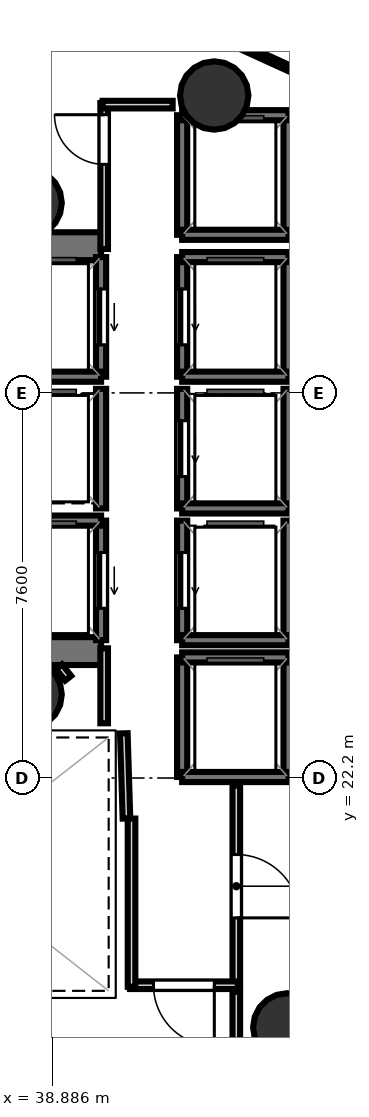
"""IFC4 building model, lengths in metres.
Left out: names, types, materials, properties, quantities, classifications, styles, units other than length and angle.
Written with IfcOpenShell. Run it as: python <this file> out.ifc"""

import sys

from ifc_helpers import new_model, si_unit, direction, frame, frame_2d, origin, origin_2d, place, context, subcontext, project, spatial, rectangle, hollow_circle, extrude, element, fill, save


model = new_model("IFC4")
c1 = context("Model", 3, precision=1e-05, world=origin(), true_north=direction((0.0, 1.0)))
c2 = subcontext(c1, "Body", "Model", "MODEL_VIEW")
j1 = project(units=[si_unit("LENGTHUNIT", "METRE"), si_unit("PLANEANGLEUNIT", "RADIAN")], contexts=[c1])
p1 = place(None, origin())
s1 = spatial("IfcSite", under=j1, at=p1, CompositionType="ELEMENT")
p2 = place(p1, origin())
s2 = spatial("IfcBuilding", under=s1, at=p2, CompositionType="ELEMENT")
p3 = place(p2, frame((0.0, 0.0, 147.6)))
s3 = spatial("IfcBuildingStorey", under=s2, at=p3, CompositionType="ELEMENT", Elevation=147.6)
p4 = place(p3, frame((29.23, 32.695, 0.0), z_axis=(0.0, 0.0, 1.0), x_axis=(1.0, 0.0, 0.0)))
e1 = element("IfcWall", 1, at=p4, inside=s3, PredefinedType="SHEAR", context=c2, shape_type="SweptSolid", body=[
    extrude(rectangle(XDim=10.62, YDim=0.55, at=frame_2d((5.31, 0.0))), origin(), (0.0, 0.0, 1.0), 3.52),
])
p5 = place(p4, frame((0.995, 0.0, 0.0)))
e2 = element("IfcOpeningElement", 2, at=p5, cuts=e1, PredefinedType="OPENING", context=c2, shape_type="SweptSolid", body=[
    extrude(rectangle(XDim=1.25, YDim=2.15, at=frame_2d((0.625, 1.075))), frame((0.0, 0.285, 0.0), z_axis=(0.0, -1.0, 0.0), x_axis=(1.0, 0.0, 0.0)), (0.0, 0.0, 1.0), 0.57),
])
p6 = place(p3, frame((29.23, 24.705, 0.0), z_axis=(0.0, 0.0, 1.0), x_axis=(1.0, 0.0, 0.0)))
e3 = element("IfcWall", 3, at=p6, inside=s3, PredefinedType="SHEAR", context=c2, shape_type="SweptSolid", body=[
    extrude(rectangle(XDim=10.62, YDim=0.55, at=frame_2d((5.31, 0.0))), origin(), (0.0, 0.0, 1.0), 3.52),
])
p7 = place(p6, frame((0.795, 0.0, 0.0)))
e4 = element("IfcOpeningElement", 4, at=p7, cuts=e3, PredefinedType="OPENING", context=c2, shape_type="SweptSolid", body=[
    extrude(rectangle(XDim=1.25, YDim=2.15, at=frame_2d((0.625, 1.075))), frame((0.0, 0.285, 0.0), z_axis=(0.0, -1.0, 0.0), x_axis=(1.0, 0.0, 0.0)), (0.0, 0.0, 1.0), 0.57),
])
for number, where, z_axis, x_axis in (
    (5, (38.4, 33.55, 0.0), (0.0, 0.0, 1.0), (1.0, 0.0, 0.0)),
    (6, (38.4, 23.85, 0.0), (0.0, 0.0, 1.0), (1.0, 0.0, 0.0)),
    (7, (42.083, 35.669, 0.0), (0.0, 0.0, 1.0), (1.0, 0.0, 0.0)),
    (8, (43.525, 17.279, 0.0), (0.0, 0.0, 1.0), (1.0, 0.0, 0.0)),
):
    element("IfcColumn", number, at=place(p3, frame(where, z_axis=z_axis, x_axis=x_axis)), inside=s3, PredefinedType="COLUMN", context=c2, shape_type="SweptSolid", body=[
        extrude(hollow_circle(Radius=0.675, WallThickness=0.032, at=origin_2d()), origin(), (0.0, 0.0, 1.0), 3.7),
    ])
p8 = place(p3, frame((39.85, 30.12, 0.0), z_axis=(0.0, 0.0, 1.0), x_axis=(0.0, 1.0, 0.0)))
e9 = element("IfcWall", 9, at=p8, inside=s3, PredefinedType="SOLIDWALL", context=c2, shape_type="SweptSolid", body=[
    extrude(rectangle(XDim=2.36, YDim=0.2, at=frame_2d((1.18, 0.0))), origin(), (0.0, 0.0, 1.0), 3.52),
])
p9 = place(p8, frame((0.63, 0.0, 0.0)))
e10 = element("IfcOpeningElement", 10, at=p9, cuts=e9, PredefinedType="OPENING", context=c2, shape_type="SweptSolid", body=[
    extrude(rectangle(XDim=1.1, YDim=2.15, at=frame_2d((0.55, 1.075))), frame((0.0, 0.11, 0.0), z_axis=(0.0, -1.0, 0.0), x_axis=(1.0, 0.0, 0.0)), (0.0, 0.0, 1.0), 0.22),
])
p10 = place(p3, frame((37.75, 30.12, 0.0), z_axis=(0.0, 0.0, 1.0), x_axis=(1.0, 0.0, 0.0)))
e11 = element("IfcWall", 11, at=p10, inside=s3, PredefinedType="SOLIDWALL", context=c2, shape_type="SweptSolid", body=[
    extrude(rectangle(XDim=2.1, YDim=0.2, at=frame_2d((1.05, 0.0))), origin(), (0.0, 0.0, 1.0), 3.52),
])
p11 = place(p3, frame((39.85, 24.92, 0.0), z_axis=(0.0, 0.0, 1.0), x_axis=(0.0, 1.0, 0.0)))
e12 = element("IfcWall", 12, at=p11, inside=s3, PredefinedType="SOLIDWALL", context=c2, shape_type="SweptSolid", body=[
    extrude(rectangle(XDim=2.36, YDim=0.2, at=frame_2d((1.18, 0.0))), origin(), (0.0, 0.0, 1.0), 3.52),
])
p12 = place(p11, frame((0.63, 0.0, 0.0)))
e13 = element("IfcOpeningElement", 13, at=p12, cuts=e12, PredefinedType="OPENING", context=c2, shape_type="SweptSolid", body=[
    extrude(rectangle(XDim=1.1, YDim=2.15, at=frame_2d((0.55, 1.075))), frame((0.0, 0.11, 0.0), z_axis=(0.0, -1.0, 0.0), x_axis=(1.0, 0.0, 0.0)), (0.0, 0.0, 1.0), 0.22),
])
p13 = place(p3, frame((37.75, 27.28, 0.0), z_axis=(0.0, 0.0, 1.0), x_axis=(1.0, 0.0, 0.0)))
e14 = element("IfcWall", 14, at=p13, inside=s3, PredefinedType="SOLIDWALL", context=c2, shape_type="SweptSolid", body=[
    extrude(rectangle(XDim=2.1, YDim=0.2, at=frame_2d((1.05, 0.0))), origin(), (0.0, 0.0, 1.0), 3.52),
])
p14 = place(p3, frame((43.55, 30.12, 0.0), z_axis=(0.0, 0.0, 1.0), x_axis=(0.0, 1.0, 0.0)))
e15 = element("IfcWall", 15, at=p14, inside=s3, PredefinedType="SOLIDWALL", context=c2, shape_type="SweptSolid", body=[
    extrude(rectangle(XDim=2.36, YDim=0.2, at=frame_2d((1.18, 0.0))), origin(), (0.0, 0.0, 1.0), 3.52),
])
p15 = place(p3, frame((41.45, 30.12, 0.0), z_axis=(0.0, 0.0, 1.0), x_axis=(0.0, 1.0, 0.0)))
e16 = element("IfcWall", 16, at=p15, inside=s3, PredefinedType="SOLIDWALL", context=c2, shape_type="SweptSolid", body=[
    extrude(rectangle(XDim=2.36, YDim=0.2, at=frame_2d((1.18, 0.0))), origin(), (0.0, 0.0, 1.0), 3.52),
])
p16 = place(p15, frame((0.63, 0.0, 0.0)))
e17 = element("IfcOpeningElement", 17, at=p16, cuts=e16, PredefinedType="OPENING", context=c2, shape_type="SweptSolid", body=[
    extrude(rectangle(XDim=1.1, YDim=2.15, at=frame_2d((0.55, 1.075))), frame((0.0, 0.11, 0.0), z_axis=(0.0, -1.0, 0.0), x_axis=(1.0, 0.0, 0.0)), (0.0, 0.0, 1.0), 0.22),
])
for number, where, z_axis, x_axis in (
    (18, (41.45, 32.48, 0.0), (0.0, 0.0, 1.0), (1.0, 0.0, 0.0)),
    (19, (41.45, 30.12, 0.0), (0.0, 0.0, 1.0), (1.0, 0.0, 0.0)),
):
    element("IfcWall", number, at=place(p3, frame(where, z_axis=z_axis, x_axis=x_axis)), inside=s3, PredefinedType="SOLIDWALL", context=c2, shape_type="SweptSolid", body=[
        extrude(rectangle(XDim=2.1, YDim=0.2, at=frame_2d((1.05, 0.0))), origin(), (0.0, 0.0, 1.0), 3.52),
    ])
p17 = place(p3, frame((43.55, 27.52, 0.0), z_axis=(0.0, 0.0, 1.0), x_axis=(0.0, 1.0, 0.0)))
e20 = element("IfcWall", 20, at=p17, inside=s3, PredefinedType="SOLIDWALL", context=c2, shape_type="SweptSolid", body=[
    extrude(rectangle(XDim=2.36, YDim=0.2, at=frame_2d((1.18, 0.0))), origin(), (0.0, 0.0, 1.0), 3.52),
])
p18 = place(p3, frame((41.45, 27.52, 0.0), z_axis=(0.0, 0.0, 1.0), x_axis=(0.0, 1.0, 0.0)))
e21 = element("IfcWall", 21, at=p18, inside=s3, PredefinedType="SOLIDWALL", context=c2, shape_type="SweptSolid", body=[
    extrude(rectangle(XDim=2.36, YDim=0.2, at=frame_2d((1.18, 0.0))), origin(), (0.0, 0.0, 1.0), 3.52),
])
p19 = place(p18, frame((0.63, 0.0, 0.0)))
e22 = element("IfcOpeningElement", 22, at=p19, cuts=e21, PredefinedType="OPENING", context=c2, shape_type="SweptSolid", body=[
    extrude(rectangle(XDim=1.1, YDim=2.15, at=frame_2d((0.55, 1.075))), frame((0.0, 0.11, 0.0), z_axis=(0.0, -1.0, 0.0), x_axis=(1.0, 0.0, 0.0)), (0.0, 0.0, 1.0), 0.22),
])
p20 = place(p3, frame((41.45, 27.52, 0.0), z_axis=(0.0, 0.0, 1.0), x_axis=(1.0, 0.0, 0.0)))
e23 = element("IfcWall", 23, at=p20, inside=s3, PredefinedType="SOLIDWALL", context=c2, shape_type="SweptSolid", body=[
    extrude(rectangle(XDim=2.1, YDim=0.2, at=frame_2d((1.05, 0.0))), origin(), (0.0, 0.0, 1.0), 3.52),
])
p21 = place(p3, frame((43.55, 24.92, 0.0), z_axis=(0.0, 0.0, 1.0), x_axis=(0.0, 1.0, 0.0)))
e24 = element("IfcWall", 24, at=p21, inside=s3, PredefinedType="SOLIDWALL", context=c2, shape_type="SweptSolid", body=[
    extrude(rectangle(XDim=2.36, YDim=0.2, at=frame_2d((1.18, 0.0))), origin(), (0.0, 0.0, 1.0), 3.52),
])
p22 = place(p3, frame((41.45, 24.92, 0.0), z_axis=(0.0, 0.0, 1.0), x_axis=(0.0, 1.0, 0.0)))
e25 = element("IfcWall", 25, at=p22, inside=s3, PredefinedType="SOLIDWALL", context=c2, shape_type="SweptSolid", body=[
    extrude(rectangle(XDim=2.36, YDim=0.2, at=frame_2d((1.18, 0.0))), origin(), (0.0, 0.0, 1.0), 3.52),
])
p23 = place(p22, frame((0.63, 0.0, 0.0)))
e26 = element("IfcOpeningElement", 26, at=p23, cuts=e25, PredefinedType="OPENING", context=c2, shape_type="SweptSolid", body=[
    extrude(rectangle(XDim=1.1, YDim=2.15, at=frame_2d((0.55, 1.075))), frame((0.0, 0.11, 0.0), z_axis=(0.0, -1.0, 0.0), x_axis=(1.0, 0.0, 0.0)), (0.0, 0.0, 1.0), 0.22),
])
p24 = place(p3, frame((41.45, 24.92, 0.0), z_axis=(0.0, 0.0, 1.0), x_axis=(1.0, 0.0, 0.0)))
e27 = element("IfcWall", 27, at=p24, inside=s3, PredefinedType="SOLIDWALL", context=c2, shape_type="SweptSolid", body=[
    extrude(rectangle(XDim=2.1, YDim=0.2, at=frame_2d((1.05, 0.0))), origin(), (0.0, 0.0, 1.0), 3.52),
])
p25 = place(p3, frame((39.85, 27.52, 0.0), z_axis=(0.0, 0.0, 1.0), x_axis=(0.0, 1.0, 0.0)))
e28 = element("IfcWall", 28, at=p25, inside=s3, PredefinedType="SOLIDWALL", context=c2, shape_type="SweptSolid", body=[
    extrude(rectangle(XDim=2.36, YDim=0.2, at=frame_2d((1.18, 0.0))), origin(), (0.0, 0.0, 1.0), 3.52),
])
for number, where, z_axis, x_axis in (
    (29, (43.55, 22.22, 0.0), (0.0, 0.0, 1.0), (0.0, 1.0, 0.0)),
    (30, (41.45, 22.22, 0.0), (0.0, 0.0, 1.0), (0.0, 1.0, 0.0)),
):
    element("IfcWall", number, at=place(p3, frame(where, z_axis=z_axis, x_axis=x_axis)), inside=s3, PredefinedType="SOLIDWALL", context=c2, shape_type="SweptSolid", body=[
        extrude(rectangle(XDim=2.36, YDim=0.2, at=frame_2d((1.18, 0.0))), origin(), (0.0, 0.0, 1.0), 3.52),
    ])
for number, where, z_axis, x_axis in (
    (31, (41.45, 24.58, 0.0), (0.0, 0.0, 1.0), (1.0, 0.0, 0.0)),
    (32, (41.45, 22.22, 0.0), (0.0, 0.0, 1.0), (1.0, 0.0, 0.0)),
):
    element("IfcWall", number, at=place(p3, frame(where, z_axis=z_axis, x_axis=x_axis)), inside=s3, PredefinedType="SOLIDWALL", context=c2, shape_type="SweptSolid", body=[
        extrude(rectangle(XDim=2.1, YDim=0.2, at=frame_2d((1.05, 0.0))), origin(), (0.0, 0.0, 1.0), 3.52),
    ])
for number, where, z_axis, x_axis in (
    (33, (43.55, 32.92, 0.0), (0.0, 0.0, 1.0), (0.0, 1.0, 0.0)),
    (34, (41.45, 32.92, 0.0), (0.0, 0.0, 1.0), (0.0, 1.0, 0.0)),
):
    element("IfcWall", number, at=place(p3, frame(where, z_axis=z_axis, x_axis=x_axis)), inside=s3, PredefinedType="SOLIDWALL", context=c2, shape_type="SweptSolid", body=[
        extrude(rectangle(XDim=2.36, YDim=0.2, at=frame_2d((1.18, 0.0))), origin(), (0.0, 0.0, 1.0), 3.52),
    ])
for number, where, z_axis, x_axis in (
    (35, (41.45, 35.28, 0.0), (0.0, 0.0, 1.0), (1.0, 0.0, 0.0)),
    (36, (41.45, 32.92, 0.0), (0.0, 0.0, 1.0), (1.0, 0.0, 0.0)),
):
    element("IfcWall", number, at=place(p3, frame(where, z_axis=z_axis, x_axis=x_axis)), inside=s3, PredefinedType="SOLIDWALL", context=c2, shape_type="SweptSolid", body=[
        extrude(rectangle(XDim=2.1, YDim=0.2, at=frame_2d((1.05, 0.0))), origin(), (0.0, 0.0, 1.0), 3.52),
    ])
p26 = place(p3, frame((40.351, 21.401, 0.0), z_axis=(0.0, 0.0, 1.0), x_axis=(-0.031058045979, 0.999517582527, 0.0)))
e37 = element("IfcWall", 37, at=p26, inside=s3, PredefinedType="PARTITIONING", context=c2, shape_type="SweptSolid", body=[
    extrude(rectangle(XDim=1.682, YDim=0.15, at=frame_2d((0.841, 0.0))), origin(), (0.0, 0.0, 1.0), 2.84),
])
p27 = place(p3, frame((39.911, 23.28, 0.0), z_axis=(0.0, 0.0, 1.0), x_axis=(0.0, 1.0, 0.0)))
e38 = element("IfcWall", 38, at=p27, inside=s3, PredefinedType="PARTITIONING", context=c2, shape_type="SweptSolid", body=[
    extrude(rectangle(XDim=1.48, YDim=0.15, at=frame_2d((0.74, 0.0))), origin(), (0.0, 0.0, 1.0), 2.84),
])
p28 = place(p3, frame((39.911, 32.64, 0.0), z_axis=(0.0, 0.0, 1.0), x_axis=(0.0, 1.0, 0.0)))
e39 = element("IfcWall", 39, at=p28, inside=s3, PredefinedType="PARTITIONING", context=c2, shape_type="SweptSolid", body=[
    extrude(rectangle(XDim=2.88, YDim=0.15, at=frame_2d((1.44, 0.0))), origin(), (0.0, 0.0, 1.0), 2.84),
])
p29 = place(p28, frame((1.67, 0.0, 0.0)))
e40 = element("IfcOpeningElement", 40, at=p29, cuts=e39, PredefinedType="OPENING", context=c2, shape_type="SweptSolid", body=[
    extrude(rectangle(XDim=0.98, YDim=2.1, at=frame_2d((0.49, 1.05))), frame((0.0, 0.085, 0.0), z_axis=(0.0, -1.0, 0.0), x_axis=(1.0, 0.0, 0.0)), (0.0, 0.0, 1.0), 0.17),
])
p30 = place(p3, frame((39.88, 35.489, 0.0), z_axis=(0.0, 0.0, 1.0), x_axis=(1.0, 0.0, 0.0)))
e41 = element("IfcWall", 41, at=p30, inside=s3, PredefinedType="PARTITIONING", context=c2, shape_type="SweptSolid", body=[
    extrude(rectangle(XDim=1.383, YDim=0.15, at=frame_2d((0.691, 0.0))), origin(), (0.0, 0.0, 1.0), 2.84),
])
p31 = place(p3, frame((42.519, 22.05, 0.0), z_axis=(0.0, 0.0, 1.0), x_axis=(0.0, -1.0, 0.0)))
e42 = element("IfcWall", 42, at=p31, inside=s3, PredefinedType="PARTITIONING", context=c2, shape_type="SweptSolid", body=[
    extrude(rectangle(XDim=3.97, YDim=0.15, at=frame_2d((1.985, 0.0))), origin(), (0.0, 0.0, 1.0), 2.84),
])
p32 = place(p31, frame((1.36, 0.0, 0.0)))
e43 = element("IfcOpeningElement", 43, at=p32, cuts=e42, PredefinedType="OPENING", context=c2, shape_type="SweptSolid", body=[
    extrude(rectangle(XDim=1.25, YDim=2.2, at=frame_2d((0.625, 1.1))), frame((0.0, 0.085, 0.0), z_axis=(0.0, -1.0, 0.0), x_axis=(1.0, 0.0, 0.0)), (0.0, 0.0, 1.0), 0.17),
])
p33 = place(p3, frame((42.55, 18.111, 0.0), z_axis=(0.0, 0.0, 1.0), x_axis=(-1.0, 0.0, 0.0)))
e44 = element("IfcWall", 44, at=p33, inside=s3, PredefinedType="PARTITIONING", context=c2, shape_type="SweptSolid", body=[
    extrude(rectangle(XDim=2.13, YDim=0.15, at=frame_2d((1.065, 0.0))), origin(), (0.0, 0.0, 1.0), 2.84),
])
p34 = place(p33, frame((0.465, 0.0, 0.0)))
e45 = element("IfcOpeningElement", 45, at=p34, cuts=e44, PredefinedType="OPENING", context=c2, shape_type="SweptSolid", body=[
    extrude(rectangle(XDim=1.2, YDim=2.15, at=frame_2d((0.6, 1.075))), frame((0.0, 0.085, 0.0), z_axis=(0.0, -1.0, 0.0), x_axis=(1.0, 0.0, 0.0)), (0.0, 0.0, 1.0), 0.17),
])
p35 = place(p3, frame((40.451, 18.08, 0.0), z_axis=(0.0, 0.0, 1.0), x_axis=(0.0, 1.0, 0.0)))
e46 = element("IfcWall", 46, at=p35, inside=s3, PredefinedType="PARTITIONING", context=c2, shape_type="SweptSolid", body=[
    extrude(rectangle(XDim=3.32, YDim=0.15, at=frame_2d((1.66, 0.0))), origin(), (0.0, 0.0, 1.0), 2.84),
])
p36 = place(p3, frame((39.202, 24.169, 0.0), z_axis=(0.0, 0.0, 1.0), x_axis=(-0.622453876994, 0.782656483405, 0.0)))
e47 = element("IfcWall", 47, at=p36, inside=s3, PredefinedType="PARTITIONING", context=c2, shape_type="SweptSolid", body=[
    extrude(rectangle(XDim=0.292, YDim=0.15, at=frame_2d((0.146, 0.0))), origin(), (0.0, 0.0, 1.0), 2.84),
])
p37 = place(p3, frame((42.519, 17.98, 0.0), z_axis=(0.0, 0.0, 1.0), x_axis=(0.0, -1.0, 0.0)))
e48 = element("IfcWall", 48, at=p37, inside=s3, PredefinedType="PARTITIONING", context=c2, shape_type="SweptSolid", body=[
    extrude(rectangle(XDim=3.288, YDim=0.15, at=frame_2d((1.644, 0.0))), origin(), (0.0, 0.0, 1.0), 2.84),
])
p38 = place(p3, frame((29.39, 42.669, 0.0), z_axis=(0.0, 0.0, 1.0), x_axis=(0.90986951671, -0.414894519802, 0.0)))
e49 = element("IfcWall", 49, at=p38, inside=s3, PredefinedType="PARTITIONING", context=c2, shape_type="SweptSolid", body=[
    extrude(rectangle(XDim=21.884, YDim=0.12, at=frame_2d((10.942, 0.0))), origin(), (0.0, 0.0, 1.0), 2.84),
])
p39 = place(p9, origin())
e50 = element("IfcDoor", 50, at=p39, inside=s3, OperationType="SLIDING_TO_LEFT", PredefinedType="DOOR", context=c2, shape_type="SweptSolid", body=[
    extrude(rectangle(XDim=1.1, YDim=2.15, at=frame_2d((0.55, 1.075))), frame((0.0, 0.025, 0.0), z_axis=(0.0, -1.0, 0.0), x_axis=(1.0, 0.0, 0.0)), (0.0, 0.0, 1.0), 0.05),
])
fill(e10, e50)
p40 = place(p12, origin())
e51 = element("IfcDoor", 51, at=p40, inside=s3, OperationType="SLIDING_TO_LEFT", PredefinedType="DOOR", context=c2, shape_type="SweptSolid", body=[
    extrude(rectangle(XDim=1.1, YDim=2.15, at=frame_2d((0.55, 1.075))), frame((0.0, 0.025, 0.0), z_axis=(0.0, -1.0, 0.0), x_axis=(1.0, 0.0, 0.0)), (0.0, 0.0, 1.0), 0.05),
])
fill(e13, e51)
p41 = place(p16, origin())
e52 = element("IfcDoor", 52, at=p41, inside=s3, OperationType="SLIDING_TO_LEFT", PredefinedType="DOOR", context=c2, shape_type="SweptSolid", body=[
    extrude(rectangle(XDim=1.1, YDim=2.15, at=frame_2d((0.55, 1.075))), frame((0.0, 0.025, 0.0), z_axis=(0.0, -1.0, 0.0), x_axis=(1.0, 0.0, 0.0)), (0.0, 0.0, 1.0), 0.05),
])
fill(e17, e52)
p42 = place(p19, origin())
e53 = element("IfcDoor", 53, at=p42, inside=s3, OperationType="SLIDING_TO_LEFT", PredefinedType="DOOR", context=c2, shape_type="SweptSolid", body=[
    extrude(rectangle(XDim=1.1, YDim=2.15, at=frame_2d((0.55, 1.075))), frame((0.0, 0.025, 0.0), z_axis=(0.0, -1.0, 0.0), x_axis=(1.0, 0.0, 0.0)), (0.0, 0.0, 1.0), 0.05),
])
fill(e22, e53)
p43 = place(p23, origin())
e54 = element("IfcDoor", 54, at=p43, inside=s3, OperationType="SLIDING_TO_LEFT", PredefinedType="DOOR", context=c2, shape_type="SweptSolid", body=[
    extrude(rectangle(XDim=1.1, YDim=2.15, at=frame_2d((0.55, 1.075))), frame((0.0, 0.025, 0.0), z_axis=(0.0, -1.0, 0.0), x_axis=(1.0, 0.0, 0.0)), (0.0, 0.0, 1.0), 0.05),
])
fill(e26, e54)
p44 = place(p34, origin())
e55 = element("IfcDoor", 55, at=p44, inside=s3, OperationType="SINGLE_SWING_LEFT", PredefinedType="DOOR", context=c2, shape_type="SweptSolid", body=[
    extrude(rectangle(XDim=1.2, YDim=2.15, at=frame_2d((0.6, 1.075))), frame((0.0, 0.025, 0.0), z_axis=(0.0, -1.0, 0.0), x_axis=(1.0, 0.0, 0.0)), (0.0, 0.0, 1.0), 0.05),
])
fill(e45, e55)
p45 = place(p32, origin())
e56 = element("IfcDoor", 56, at=p45, inside=s3, OperationType="SINGLE_SWING_RIGHT", PredefinedType="DOOR", context=c2, shape_type="SweptSolid", body=[
    extrude(rectangle(XDim=1.25, YDim=2.2, at=frame_2d((0.625, 1.1))), frame((0.0, 0.025, 0.0), z_axis=(0.0, -1.0, 0.0), x_axis=(1.0, 0.0, 0.0)), (0.0, 0.0, 1.0), 0.05),
])
fill(e43, e56)
p46 = place(p29, origin())
e57 = element("IfcDoor", 57, at=p46, inside=s3, OperationType="SINGLE_SWING_RIGHT", PredefinedType="DOOR", context=c2, shape_type="SweptSolid", body=[
    extrude(rectangle(XDim=0.98, YDim=2.1, at=frame_2d((0.49, 1.05))), frame((0.0, 0.025, 0.0), z_axis=(0.0, -1.0, 0.0), x_axis=(1.0, 0.0, 0.0)), (0.0, 0.0, 1.0), 0.05),
])
fill(e40, e57)
save(model, sys.argv[1])
